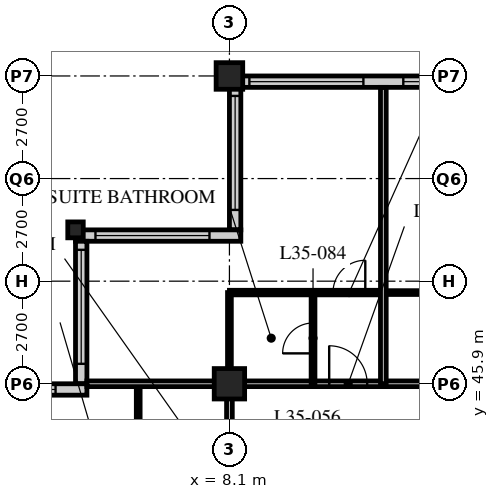
"""IFC4 building model, lengths in metres.
Left out: names, types, materials, properties, quantities, classifications, styles, units other than length and angle.
Written with IfcOpenShell. Run it as: python <this file> out.ifc"""

import sys

from ifc_helpers import new_model, si_unit, direction, frame, frame_2d, origin, origin_2d, place, context, subcontext, project, spatial, rectangle, hollow_rectangle, i_section, extrude, element, fill, save


model = new_model("IFC4")
c1 = context("Model", 3, precision=1e-05, world=origin(), true_north=direction((0.0, 1.0)))
c2 = subcontext(c1, "Body", "Model", "MODEL_VIEW")
j1 = project(units=[si_unit("LENGTHUNIT", "METRE"), si_unit("PLANEANGLEUNIT", "RADIAN")], contexts=[c1])
p1 = place(None, origin())
s1 = spatial("IfcSite", under=j1, at=p1, CompositionType="ELEMENT")
p2 = place(p1, origin())
s2 = spatial("IfcBuilding", under=s1, at=p2, CompositionType="ELEMENT")
p3 = place(p2, frame((0.0, 0.0, 137.4)))
s3 = spatial("IfcBuildingStorey", under=s2, at=p3, CompositionType="ELEMENT", Elevation=137.4)
p4 = place(p3, frame((4.05, 49.95, 0.0), z_axis=(0.0, 0.0, 1.0), x_axis=(1.0, 0.0, 0.0)))
e1 = element("IfcColumn", 1, at=p4, inside=s3, PredefinedType="COLUMN", context=c2, shape_type="SweptSolid", body=[
    extrude(i_section(OverallWidth=0.407, OverallDepth=0.419, WebThickness=0.031, FlangeThickness=0.049, FilletRadius=0.015, at=origin_2d()), origin(), (0.0, 0.0, 1.0), 3.4),
])
p5 = place(p3, frame((8.1, 45.9, 0.0), z_axis=(0.0, 0.0, 1.0), x_axis=(1.0, 0.0, 0.0)))
e2 = element("IfcColumn", 2, at=p5, inside=s3, PredefinedType="COLUMN", context=c2, shape_type="SweptSolid", body=[
    extrude(hollow_rectangle(XDim=0.8, YDim=0.8, WallThickness=0.08, at=origin_2d()), origin(), (0.0, 0.0, 1.0), 3.4),
])
p6 = place(p3, frame((8.1, 54.0, 0.0), z_axis=(0.0, 0.0, 1.0), x_axis=(1.0, 0.0, 0.0)))
e3 = element("IfcColumn", 3, at=p6, inside=s3, PredefinedType="COLUMN", context=c2, shape_type="SweptSolid", body=[
    extrude(hollow_rectangle(XDim=0.7, YDim=0.7, WallThickness=0.07, at=origin_2d()), origin(), (0.0, 0.0, 1.0), 3.4),
])
p7 = place(p3, frame((48.3, 53.85, 0.0), z_axis=(0.0, 0.0, 1.0), x_axis=(-1.0, 0.0, 0.0)))
e4 = element("IfcWall", 4, at=p7, inside=s3, PredefinedType="SOLIDWALL", context=c2, shape_type="SweptSolid", body=[
    extrude(rectangle(XDim=40.2, YDim=0.3, at=frame_2d((20.1, 0.0))), origin(), (0.0, 0.0, 1.0), 3.19),
])
p8 = place(p7, frame((0.225, 0.0, 0.9)))
e5 = element("IfcOpeningElement", 5, at=p8, cuts=e4, PredefinedType="OPENING", context=c2, shape_type="SweptSolid", body=[
    extrude(rectangle(XDim=3.0, YDim=2.0, at=frame_2d((1.5, 1.0))), frame((0.0, 0.16, 0.0), z_axis=(0.0, -1.0, 0.0), x_axis=(1.0, 0.0, 0.0)), (0.0, 0.0, 1.0), 0.32),
])
p9 = place(p7, frame((4.275, 0.0, 0.9)))
e6 = element("IfcOpeningElement", 6, at=p9, cuts=e4, PredefinedType="OPENING", context=c2, shape_type="SweptSolid", body=[
    extrude(rectangle(XDim=3.0, YDim=2.0, at=frame_2d((1.5, 1.0))), frame((0.0, 0.16, 0.0), z_axis=(0.0, -1.0, 0.0), x_axis=(1.0, 0.0, 0.0)), (0.0, 0.0, 1.0), 0.32),
])
p10 = place(p7, frame((8.325, 0.0, 0.9)))
e7 = element("IfcOpeningElement", 7, at=p10, cuts=e4, PredefinedType="OPENING", context=c2, shape_type="SweptSolid", body=[
    extrude(rectangle(XDim=3.0, YDim=2.0, at=frame_2d((1.5, 1.0))), frame((0.0, 0.16, 0.0), z_axis=(0.0, -1.0, 0.0), x_axis=(1.0, 0.0, 0.0)), (0.0, 0.0, 1.0), 0.32),
])
p11 = place(p7, frame((12.375, 0.0, 0.9)))
e8 = element("IfcOpeningElement", 8, at=p11, cuts=e4, PredefinedType="OPENING", context=c2, shape_type="SweptSolid", body=[
    extrude(rectangle(XDim=3.0, YDim=2.0, at=frame_2d((1.5, 1.0))), frame((0.0, 0.16, 0.0), z_axis=(0.0, -1.0, 0.0), x_axis=(1.0, 0.0, 0.0)), (0.0, 0.0, 1.0), 0.32),
])
p12 = place(p7, frame((16.425, 0.0, 0.9)))
e9 = element("IfcOpeningElement", 9, at=p12, cuts=e4, PredefinedType="OPENING", context=c2, shape_type="SweptSolid", body=[
    extrude(rectangle(XDim=3.0, YDim=2.0, at=frame_2d((1.5, 1.0))), frame((0.0, 0.16, 0.0), z_axis=(0.0, -1.0, 0.0), x_axis=(1.0, 0.0, 0.0)), (0.0, 0.0, 1.0), 0.32),
])
p13 = place(p7, frame((20.475, 0.0, 0.9)))
e10 = element("IfcOpeningElement", 10, at=p13, cuts=e4, PredefinedType="OPENING", context=c2, shape_type="SweptSolid", body=[
    extrude(rectangle(XDim=3.0, YDim=2.0, at=frame_2d((1.5, 1.0))), frame((0.0, 0.16, 0.0), z_axis=(0.0, -1.0, 0.0), x_axis=(1.0, 0.0, 0.0)), (0.0, 0.0, 1.0), 0.32),
])
p14 = place(p7, frame((24.525, 0.0, 0.9)))
e11 = element("IfcOpeningElement", 11, at=p14, cuts=e4, PredefinedType="OPENING", context=c2, shape_type="SweptSolid", body=[
    extrude(rectangle(XDim=3.0, YDim=2.0, at=frame_2d((1.5, 1.0))), frame((0.0, 0.16, 0.0), z_axis=(0.0, -1.0, 0.0), x_axis=(1.0, 0.0, 0.0)), (0.0, 0.0, 1.0), 0.32),
])
p15 = place(p7, frame((28.575, 0.0, 0.9)))
e12 = element("IfcOpeningElement", 12, at=p15, cuts=e4, PredefinedType="OPENING", context=c2, shape_type="SweptSolid", body=[
    extrude(rectangle(XDim=3.0, YDim=2.0, at=frame_2d((1.5, 1.0))), frame((0.0, 0.16, 0.0), z_axis=(0.0, -1.0, 0.0), x_axis=(1.0, 0.0, 0.0)), (0.0, 0.0, 1.0), 0.32),
])
p16 = place(p7, frame((32.625, 0.0, 0.9)))
e13 = element("IfcOpeningElement", 13, at=p16, cuts=e4, PredefinedType="OPENING", context=c2, shape_type="SweptSolid", body=[
    extrude(rectangle(XDim=3.0, YDim=2.0, at=frame_2d((1.5, 1.0))), frame((0.0, 0.16, 0.0), z_axis=(0.0, -1.0, 0.0), x_axis=(1.0, 0.0, 0.0)), (0.0, 0.0, 1.0), 0.32),
])
p17 = place(p7, frame((36.675, 0.0, 0.9)))
e14 = element("IfcOpeningElement", 14, at=p17, cuts=e4, PredefinedType="OPENING", context=c2, shape_type="SweptSolid", body=[
    extrude(rectangle(XDim=3.0, YDim=2.0, at=frame_2d((1.5, 1.0))), frame((0.0, 0.16, 0.0), z_axis=(0.0, -1.0, 0.0), x_axis=(1.0, 0.0, 0.0)), (0.0, 0.0, 1.0), 0.32),
])
p18 = place(p3, frame((8.25, 53.7, 0.0), z_axis=(0.0, 0.0, 1.0), x_axis=(0.0, -1.0, 0.0)))
e15 = element("IfcWall", 15, at=p18, inside=s3, PredefinedType="SOLIDWALL", context=c2, shape_type="SweptSolid", body=[
    extrude(rectangle(XDim=3.75, YDim=0.3, at=frame_2d((1.875, 0.0))), origin(), (0.0, 0.0, 1.0), 3.19),
])
p19 = place(p18, frame((0.225, 0.0, 0.9)))
e16 = element("IfcOpeningElement", 16, at=p19, cuts=e15, PredefinedType="OPENING", context=c2, shape_type="SweptSolid", body=[
    extrude(rectangle(XDim=3.0, YDim=1.5, at=frame_2d((1.5, 0.75))), frame((0.0, 0.16, 0.0), z_axis=(0.0, -1.0, 0.0), x_axis=(1.0, 0.0, 0.0)), (0.0, 0.0, 1.0), 0.32),
])
p20 = place(p3, frame((8.4, 49.8, 0.0), z_axis=(0.0, 0.0, 1.0), x_axis=(-1.0, 0.0, 0.0)))
e17 = element("IfcWall", 17, at=p20, inside=s3, PredefinedType="SOLIDWALL", context=c2, shape_type="SweptSolid", body=[
    extrude(rectangle(XDim=4.35, YDim=0.3, at=frame_2d((2.175, 0.0))), origin(), (0.0, 0.0, 1.0), 3.19),
])
p21 = place(p20, frame((0.825, 0.0, 0.9)))
e18 = element("IfcOpeningElement", 18, at=p21, cuts=e17, PredefinedType="OPENING", context=c2, shape_type="SweptSolid", body=[
    extrude(rectangle(XDim=3.0, YDim=1.5, at=frame_2d((1.5, 0.75))), frame((0.0, 0.16, 0.0), z_axis=(0.0, -1.0, 0.0), x_axis=(1.0, 0.0, 0.0)), (0.0, 0.0, 1.0), 0.32),
])
p22 = place(p3, frame((4.2, 49.65, 0.0), z_axis=(0.0, 0.0, 1.0), x_axis=(0.0, -1.0, 0.0)))
e19 = element("IfcWall", 19, at=p22, inside=s3, PredefinedType="SOLIDWALL", context=c2, shape_type="SweptSolid", body=[
    extrude(rectangle(XDim=3.75, YDim=0.3, at=frame_2d((1.875, 0.0))), origin(), (0.0, 0.0, 1.0), 3.19),
])
p23 = place(p22, frame((0.225, 0.0, 0.9)))
e20 = element("IfcOpeningElement", 20, at=p23, cuts=e19, PredefinedType="OPENING", context=c2, shape_type="SweptSolid", body=[
    extrude(rectangle(XDim=3.0, YDim=1.5, at=frame_2d((1.5, 0.75))), frame((0.0, 0.16, 0.0), z_axis=(0.0, -1.0, 0.0), x_axis=(1.0, 0.0, 0.0)), (0.0, 0.0, 1.0), 0.32),
])
p24 = place(p3, frame((4.35, 45.75, 0.0), z_axis=(0.0, 0.0, 1.0), x_axis=(-1.0, 0.0, 0.0)))
e21 = element("IfcWall", 21, at=p24, inside=s3, PredefinedType="SOLIDWALL", context=c2, shape_type="SweptSolid", body=[
    extrude(rectangle(XDim=4.35, YDim=0.3, at=frame_2d((2.175, 0.0))), origin(), (0.0, 0.0, 1.0), 3.19),
])
p25 = place(p24, frame((0.825, 0.0, 0.9)))
e22 = element("IfcOpeningElement", 22, at=p25, cuts=e21, PredefinedType="OPENING", context=c2, shape_type="SweptSolid", body=[
    extrude(rectangle(XDim=3.0, YDim=1.5, at=frame_2d((1.5, 0.75))), frame((0.0, 0.16, 0.0), z_axis=(0.0, -1.0, 0.0), x_axis=(1.0, 0.0, 0.0)), (0.0, 0.0, 1.0), 0.32),
])
p26 = place(p3, frame((8.1, 45.9, 0.0), z_axis=(0.0, 0.0, 1.0), x_axis=(1.0, 0.0, 0.0)))
e23 = element("IfcWall", 23, at=p26, inside=s3, PredefinedType="PARTITIONING", context=c2, shape_type="SweptSolid", body=[
    extrude(rectangle(XDim=36.45, YDim=0.15, at=frame_2d((18.225, 0.0))), origin(), (0.0, 0.0, 1.0), 2.578),
])
p27 = place(p26, frame((9.625, 0.0, 0.0)))
e24 = element("IfcOpeningElement", 24, at=p27, cuts=e23, PredefinedType="OPENING", context=c2, shape_type="SweptSolid", body=[
    extrude(rectangle(XDim=1.0, YDim=2.1, at=frame_2d((0.5, 1.05))), frame((0.0, 0.085, 0.0), z_axis=(0.0, -1.0, 0.0), x_axis=(1.0, 0.0, 0.0)), (0.0, 0.0, 1.0), 0.17),
])
p28 = place(p26, frame((21.775, 0.0, 0.0)))
e25 = element("IfcOpeningElement", 25, at=p28, cuts=e23, PredefinedType="OPENING", context=c2, shape_type="SweptSolid", body=[
    extrude(rectangle(XDim=1.0, YDim=2.1, at=frame_2d((0.5, 1.05))), frame((0.0, 0.085, 0.0), z_axis=(0.0, -1.0, 0.0), x_axis=(1.0, 0.0, 0.0)), (0.0, 0.0, 1.0), 0.17),
])
p29 = place(p26, frame((28.95, 0.0, 0.0)))
e26 = element("IfcOpeningElement", 26, at=p29, cuts=e23, PredefinedType="OPENING", context=c2, shape_type="SweptSolid", body=[
    extrude(rectangle(XDim=1.0, YDim=2.1, at=frame_2d((0.5, 1.05))), frame((0.0, 0.085, 0.0), z_axis=(0.0, -1.0, 0.0), x_axis=(1.0, 0.0, 0.0)), (0.0, 0.0, 1.0), 0.17),
])
p30 = place(p26, frame((33.925, 0.0, 0.0)))
e27 = element("IfcOpeningElement", 27, at=p30, cuts=e23, PredefinedType="OPENING", context=c2, shape_type="SweptSolid", body=[
    extrude(rectangle(XDim=1.0, YDim=2.1, at=frame_2d((0.5, 1.05))), frame((0.0, 0.085, 0.0), z_axis=(0.0, -1.0, 0.0), x_axis=(1.0, 0.0, 0.0)), (0.0, 0.0, 1.0), 0.17),
])
p31 = place(p26, frame((2.625, 0.0, 0.0)))
e28 = element("IfcOpeningElement", 28, at=p31, cuts=e23, PredefinedType="OPENING", context=c2, shape_type="SweptSolid", body=[
    extrude(rectangle(XDim=1.0, YDim=2.1, at=frame_2d((0.5, 1.05))), frame((0.0, 0.085, 0.0), z_axis=(0.0, -1.0, 0.0), x_axis=(1.0, 0.0, 0.0)), (0.0, 0.0, 1.0), 0.17),
])
p32 = place(p3, frame((8.1, 17.55, 0.0), z_axis=(0.0, 0.0, 1.0), x_axis=(0.0, 1.0, 0.0)))
e29 = element("IfcWall", 29, at=p32, inside=s3, PredefinedType="PARTITIONING", context=c2, shape_type="SweptSolid", body=[
    extrude(rectangle(XDim=28.35, YDim=0.15, at=frame_2d((14.175, 0.0))), origin(), (0.0, 0.0, 1.0), 2.578),
])
p33 = place(p32, frame((1.9, 0.0, 0.0)))
e30 = element("IfcOpeningElement", 30, at=p33, cuts=e29, PredefinedType="OPENING", context=c2, shape_type="SweptSolid", body=[
    extrude(rectangle(XDim=1.0, YDim=2.1, at=frame_2d((0.5, 1.05))), frame((0.0, 0.085, 0.0), z_axis=(0.0, -1.0, 0.0), x_axis=(1.0, 0.0, 0.0)), (0.0, 0.0, 1.0), 0.17),
])
p34 = place(p32, frame((10.0, 0.0, 0.0)))
e31 = element("IfcOpeningElement", 31, at=p34, cuts=e29, PredefinedType="OPENING", context=c2, shape_type="SweptSolid", body=[
    extrude(rectangle(XDim=1.0, YDim=2.1, at=frame_2d((0.5, 1.05))), frame((0.0, 0.085, 0.0), z_axis=(0.0, -1.0, 0.0), x_axis=(1.0, 0.0, 0.0)), (0.0, 0.0, 1.0), 0.17),
])
p35 = place(p32, frame((18.1, 0.0, 0.0)))
e32 = element("IfcOpeningElement", 32, at=p35, cuts=e29, PredefinedType="OPENING", context=c2, shape_type="SweptSolid", body=[
    extrude(rectangle(XDim=1.0, YDim=2.1, at=frame_2d((0.5, 1.05))), frame((0.0, 0.085, 0.0), z_axis=(0.0, -1.0, 0.0), x_axis=(1.0, 0.0, 0.0)), (0.0, 0.0, 1.0), 0.17),
])
p36 = place(p32, frame((24.9, 0.0, 0.0)))
e33 = element("IfcOpeningElement", 33, at=p36, cuts=e29, PredefinedType="OPENING", context=c2, shape_type="SweptSolid", body=[
    extrude(rectangle(XDim=1.0, YDim=2.1, at=frame_2d((0.5, 1.05))), frame((0.0, 0.085, 0.0), z_axis=(0.0, -1.0, 0.0), x_axis=(1.0, 0.0, 0.0)), (0.0, 0.0, 1.0), 0.17),
])
p37 = place(p3, frame((12.15, 48.3, 0.0), z_axis=(0.0, 0.0, 1.0), x_axis=(1.0, 0.0, 0.0)))
e34 = element("IfcWall", 34, at=p37, inside=s3, PredefinedType="PARTITIONING", context=c2, shape_type="SweptSolid", body=[
    extrude(rectangle(XDim=2.6, YDim=0.1, at=frame_2d((1.3, 0.0))), origin(), (0.0, 0.0, 1.0), 3.19),
])
p38 = place(p3, frame((5.7, 43.6, 0.0), z_axis=(0.0, 0.0, 1.0), x_axis=(0.0, 1.0, 0.0)))
e35 = element("IfcWall", 35, at=p38, inside=s3, PredefinedType="PARTITIONING", context=c2, shape_type="SweptSolid", body=[
    extrude(rectangle(XDim=2.3, YDim=0.1, at=frame_2d((1.15, 0.0))), origin(), (0.0, 0.0, 1.0), 3.19),
])
p39 = place(p3, frame((8.1, 48.3, 0.0), z_axis=(0.0, 0.0, 1.0), x_axis=(1.0, 0.0, 0.0)))
e36 = element("IfcWall", 36, at=p39, inside=s3, PredefinedType="PARTITIONING", context=c2, shape_type="SweptSolid", body=[
    extrude(rectangle(XDim=4.05, YDim=0.12, at=frame_2d((2.025, 0.0))), origin(), (0.0, 0.0, 1.0), 3.19),
])
p40 = place(p39, frame((2.725, 0.0, 0.0)))
e37 = element("IfcOpeningElement", 37, at=p40, cuts=e36, PredefinedType="OPENING", context=c2, shape_type="SweptSolid", body=[
    extrude(rectangle(XDim=0.85, YDim=2.1, at=frame_2d((0.425, 1.05))), frame((0.0, 0.07, 0.0), z_axis=(0.0, -1.0, 0.0), x_axis=(1.0, 0.0, 0.0)), (0.0, 0.0, 1.0), 0.14),
])
p41 = place(p3, frame((10.3, 45.9, 0.0), z_axis=(0.0, 0.0, 1.0), x_axis=(0.0, 1.0, 0.0)))
e38 = element("IfcWall", 38, at=p41, inside=s3, PredefinedType="PARTITIONING", context=c2, shape_type="SweptSolid", body=[
    extrude(rectangle(XDim=2.4, YDim=0.1, at=frame_2d((1.2, 0.0))), origin(), (0.0, 0.0, 1.0), 3.19),
])
p42 = place(p41, frame((0.8, 0.0, 0.0)))
e39 = element("IfcOpeningElement", 39, at=p42, cuts=e38, PredefinedType="OPENING", context=c2, shape_type="SweptSolid", body=[
    extrude(rectangle(XDim=0.8, YDim=2.1, at=frame_2d((0.4, 1.05))), frame((0.0, 0.06, 0.0), z_axis=(0.0, -1.0, 0.0), x_axis=(1.0, 0.0, 0.0)), (0.0, 0.0, 1.0), 0.12),
])
p43 = place(p3, frame((8.1, 45.9, 0.0), z_axis=(0.0, 0.0, 1.0), x_axis=(0.0, 1.0, 0.0)))
e40 = element("IfcWall", 40, at=p43, inside=s3, PredefinedType="PARTITIONING", context=c2, shape_type="SweptSolid", body=[
    extrude(rectangle(XDim=2.4, YDim=0.1, at=frame_2d((1.2, 0.0))), origin(), (0.0, 0.0, 1.0), 2.578),
])
p44 = place(p3, frame((4.35, 45.9, 0.0), z_axis=(0.0, 0.0, 1.0), x_axis=(1.0, 0.0, 0.0)))
e41 = element("IfcWall", 41, at=p44, inside=s3, PredefinedType="PARTITIONING", context=c2, shape_type="SweptSolid", body=[
    extrude(rectangle(XDim=3.75, YDim=0.15, at=frame_2d((1.875, 0.0))), origin(), (0.0, 0.0, 1.0), 2.578),
])
p45 = place(p3, frame((12.15, 45.9, 0.0), z_axis=(0.0, 0.0, 1.0), x_axis=(0.0, 1.0, 0.0)))
e42 = element("IfcWall", 42, at=p45, inside=s3, PredefinedType="PARTITIONING", context=c2, shape_type="SweptSolid", body=[
    extrude(rectangle(XDim=7.8, YDim=0.15, at=frame_2d((3.9, 0.0))), origin(), (0.0, 0.0, 1.0), 3.19),
])
p46 = place(p16, origin())
e43 = element("IfcWindow", 43, at=p46, inside=s3, PartitioningType="SINGLE_PANEL", PredefinedType="WINDOW", context=c2, shape_type="SweptSolid", body=[
    extrude(rectangle(XDim=3.0, YDim=2.0, at=frame_2d((1.5, 1.0))), frame((0.0, 0.03, 0.0), z_axis=(0.0, -1.0, 0.0), x_axis=(1.0, 0.0, 0.0)), (0.0, 0.0, 1.0), 0.06),
])
fill(e13, e43)
p47 = place(p17, origin())
e44 = element("IfcWindow", 44, at=p47, inside=s3, PartitioningType="SINGLE_PANEL", PredefinedType="WINDOW", context=c2, shape_type="SweptSolid", body=[
    extrude(rectangle(XDim=3.0, YDim=2.0, at=frame_2d((1.5, 1.0))), frame((0.0, 0.03, 0.0), z_axis=(0.0, -1.0, 0.0), x_axis=(1.0, 0.0, 0.0)), (0.0, 0.0, 1.0), 0.06),
])
fill(e14, e44)
p48 = place(p19, origin())
e45 = element("IfcWindow", 45, at=p48, inside=s3, PartitioningType="SINGLE_PANEL", PredefinedType="WINDOW", context=c2, shape_type="SweptSolid", body=[
    extrude(rectangle(XDim=3.0, YDim=1.5, at=frame_2d((1.5, 0.75))), frame((0.0, 0.03, 0.0), z_axis=(0.0, -1.0, 0.0), x_axis=(1.0, 0.0, 0.0)), (0.0, 0.0, 1.0), 0.06),
])
fill(e16, e45)
p49 = place(p21, origin())
e46 = element("IfcWindow", 46, at=p49, inside=s3, PartitioningType="SINGLE_PANEL", PredefinedType="WINDOW", context=c2, shape_type="SweptSolid", body=[
    extrude(rectangle(XDim=3.0, YDim=1.5, at=frame_2d((1.5, 0.75))), frame((0.0, 0.03, 0.0), z_axis=(0.0, -1.0, 0.0), x_axis=(1.0, 0.0, 0.0)), (0.0, 0.0, 1.0), 0.06),
])
fill(e18, e46)
p50 = place(p23, origin())
e47 = element("IfcWindow", 47, at=p50, inside=s3, PartitioningType="SINGLE_PANEL", PredefinedType="WINDOW", context=c2, shape_type="SweptSolid", body=[
    extrude(rectangle(XDim=3.0, YDim=1.5, at=frame_2d((1.5, 0.75))), frame((0.0, 0.03, 0.0), z_axis=(0.0, -1.0, 0.0), x_axis=(1.0, 0.0, 0.0)), (0.0, 0.0, 1.0), 0.06),
])
fill(e20, e47)
p51 = place(p25, origin())
e48 = element("IfcWindow", 48, at=p51, inside=s3, PartitioningType="SINGLE_PANEL", PredefinedType="WINDOW", context=c2, shape_type="SweptSolid", body=[
    extrude(rectangle(XDim=3.0, YDim=1.5, at=frame_2d((1.5, 0.75))), frame((0.0, 0.03, 0.0), z_axis=(0.0, -1.0, 0.0), x_axis=(1.0, 0.0, 0.0)), (0.0, 0.0, 1.0), 0.06),
])
fill(e22, e48)
p52 = place(p42, origin())
e49 = element("IfcDoor", 49, at=p52, inside=s3, OperationType="SINGLE_SWING_LEFT", PredefinedType="DOOR", context=c2, shape_type="SweptSolid", body=[
    extrude(rectangle(XDim=0.8, YDim=2.1, at=frame_2d((0.4, 1.05))), frame((0.0, 0.025, 0.0), z_axis=(0.0, -1.0, 0.0), x_axis=(1.0, 0.0, 0.0)), (0.0, 0.0, 1.0), 0.05),
])
fill(e39, e49)
p53 = place(p31, origin())
e50 = element("IfcDoor", 50, at=p53, inside=s3, OperationType="SINGLE_SWING_LEFT", PredefinedType="DOOR", context=c2, shape_type="SweptSolid", body=[
    extrude(rectangle(XDim=1.0, YDim=2.1, at=frame_2d((0.5, 1.05))), frame((0.0, 0.025, 0.0), z_axis=(0.0, -1.0, 0.0), x_axis=(1.0, 0.0, 0.0)), (0.0, 0.0, 1.0), 0.05),
])
fill(e28, e50)
p54 = place(p40, origin())
e51 = element("IfcDoor", 51, at=p54, inside=s3, OperationType="SINGLE_SWING_RIGHT", PredefinedType="DOOR", context=c2, shape_type="SweptSolid", body=[
    extrude(rectangle(XDim=0.85, YDim=2.1, at=frame_2d((0.425, 1.05))), frame((0.0, 0.025, 0.0), z_axis=(0.0, -1.0, 0.0), x_axis=(1.0, 0.0, 0.0)), (0.0, 0.0, 1.0), 0.05),
])
fill(e37, e51)
save(model, sys.argv[1])
